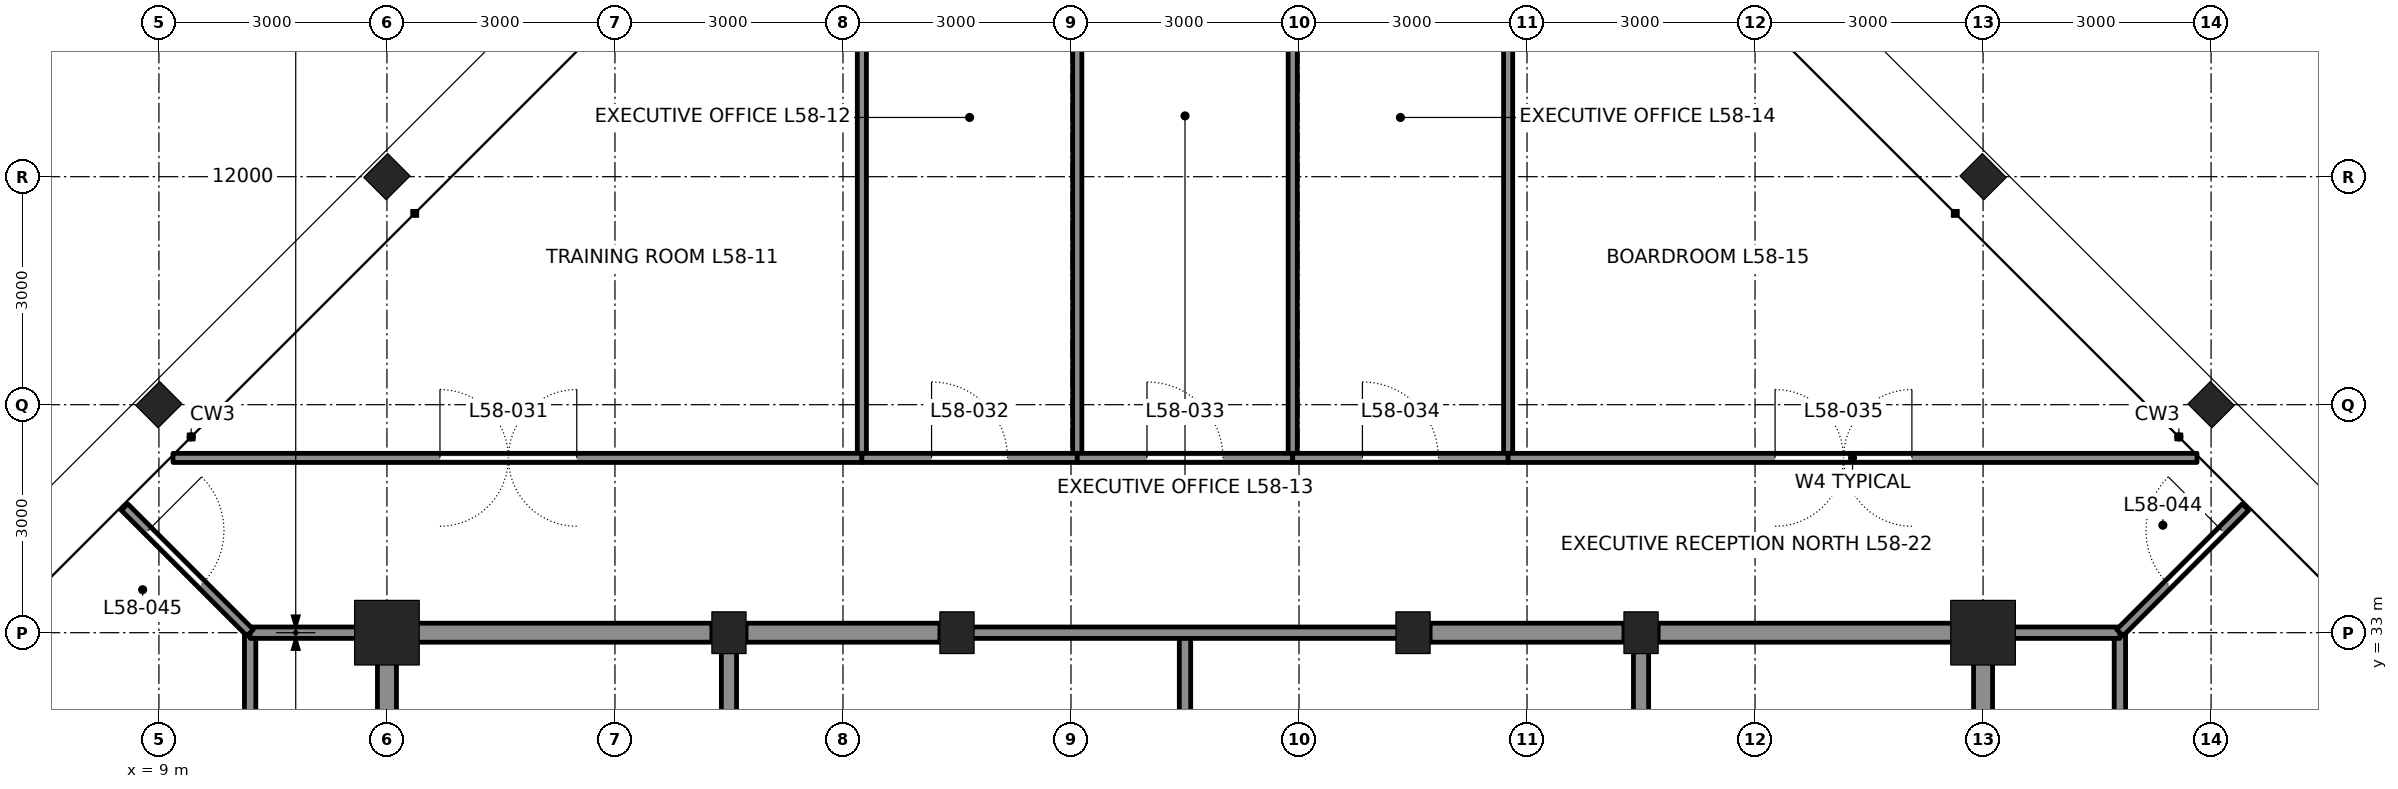
"""IFC4 building model, lengths in metres.
Left out: names, types, materials, properties, quantities, classifications, styles, units other than length and angle.
Written with IfcOpenShell. Run it as: python <this file> out.ifc"""

import sys

from ifc_helpers import new_model, si_unit, direction, frame, frame_2d, origin, origin_2d, place, context, subcontext, project, spatial, rectangle, hollow_rectangle, i_section, extrude, element, fill, save


model = new_model("IFC4")
c1 = context("Model", 3, precision=1e-05, world=origin(), true_north=direction((0.0, 1.0)))
c2 = subcontext(c1, "Body", "Model", "MODEL_VIEW")
j1 = project(units=[si_unit("LENGTHUNIT", "METRE"), si_unit("PLANEANGLEUNIT", "RADIAN")], contexts=[c1])
p1 = place(None, origin())
s1 = spatial("IfcSite", under=j1, at=p1, CompositionType="ELEMENT")
p2 = place(p1, origin())
s2 = spatial("IfcBuilding", under=s1, at=p2, CompositionType="ELEMENT")
p3 = place(p2, frame((0.0, 0.0, 262.2)))
s3 = spatial("IfcBuildingStorey", under=s2, at=p3, CompositionType="ELEMENT", Elevation=262.2)
for number, where, z_axis, x_axis in (
    (1, (36.0, 36.0, 0.0), (0.0, 0.0, 1.0), (0.707, 0.707, 0.0)),
    (2, (33.0, 39.0, 0.0), (0.0, 0.0, 1.0), (0.707, 0.707, 0.0)),
    (3, (12.0, 39.0, 0.0), (0.0, 0.0, 1.0), (-0.707, 0.707, 0.0)),
    (4, (9.0, 36.0, 0.0), (0.0, 0.0, 1.0), (-0.707, 0.707, 0.0)),
):
    element("IfcColumn", number, at=place(p3, frame(where, z_axis=z_axis, x_axis=x_axis)), inside=s3, PredefinedType="COLUMN", context=c2, shape_type="SweptSolid", body=[
        extrude(i_section(OverallWidth=0.417, OverallDepth=0.445, WebThickness=0.039, FlangeThickness=0.063, at=origin_2d()), origin(), (0.0, 0.0, 1.0), 4.2),
    ])
p4 = place(p3, frame((12.0, 33.0, 0.0), z_axis=(0.0, 0.0, 1.0), x_axis=(1.0, 0.0, 0.0)))
e5 = element("IfcColumn", 5, at=p4, inside=s3, PredefinedType="COLUMN", context=c2, shape_type="SweptSolid", body=[
    extrude(hollow_rectangle(XDim=0.85, YDim=0.85, WallThickness=0.085, at=origin_2d()), origin(), (0.0, 0.0, 1.0), 4.2),
])
for number, where, z_axis, x_axis in (
    (6, (16.5, 33.0, 0.0), (0.0, 0.0, 1.0), (1.0, 0.0, 0.0)),
    (7, (19.5, 33.0, 0.0), (0.0, 0.0, 1.0), (1.0, 0.0, 0.0)),
    (8, (25.5, 33.0, 0.0), (0.0, 0.0, 1.0), (1.0, 0.0, 0.0)),
    (9, (28.5, 33.0, 0.0), (0.0, 0.0, 1.0), (1.0, 0.0, 0.0)),
):
    element("IfcColumn", number, at=place(p3, frame(where, z_axis=z_axis, x_axis=x_axis)), inside=s3, PredefinedType="COLUMN", context=c2, shape_type="SweptSolid", body=[
        extrude(i_section(OverallWidth=0.449, OverallDepth=0.549, WebThickness=0.072, FlangeThickness=0.115, at=origin_2d()), origin(), (0.0, 0.0, 1.0), 4.2),
    ])
p5 = place(p3, frame((33.0, 33.0, 0.0), z_axis=(0.0, 0.0, 1.0), x_axis=(1.0, 0.0, 0.0)))
e10 = element("IfcColumn", 10, at=p5, inside=s3, PredefinedType="COLUMN", context=c2, shape_type="SweptSolid", body=[
    extrude(hollow_rectangle(XDim=0.85, YDim=0.85, WallThickness=0.085, at=origin_2d()), origin(), (0.0, 0.0, 1.0), 4.2),
])
p6 = place(p3, frame((12.0, 24.25, 0.0), z_axis=(0.0, 0.0, 1.0), x_axis=(0.0, 1.0, 0.0)))
e11 = element("IfcWall", 11, at=p6, inside=s3, PredefinedType="SOLIDWALL", context=c2, shape_type="SweptSolid", body=[
    extrude(rectangle(XDim=8.5, YDim=0.25, at=frame_2d((4.25, 0.0))), origin(), (0.0, 0.0, 1.0), 3.113),
])
p7 = place(p6, frame((0.65, 0.0, 0.0)))
e12 = element("IfcOpeningElement", 12, at=p7, cuts=e11, PredefinedType="OPENING", context=c2, shape_type="SweptSolid", body=[
    extrude(rectangle(XDim=1.2, YDim=2.1, at=frame_2d((0.6, 1.05))), frame((0.0, 0.135, 0.0), z_axis=(0.0, -1.0, 0.0), x_axis=(1.0, 0.0, 0.0)), (0.0, 0.0, 1.0), 0.27),
])
p8 = place(p6, frame((6.875, 0.0, 0.0)))
e13 = element("IfcOpeningElement", 13, at=p8, cuts=e11, PredefinedType="OPENING", context=c2, shape_type="SweptSolid", body=[
    extrude(rectangle(XDim=0.75, YDim=2.1, at=frame_2d((0.375, 1.05))), frame((0.0, 0.135, 0.0), z_axis=(0.0, -1.0, 0.0), x_axis=(1.0, 0.0, 0.0)), (0.0, 0.0, 1.0), 0.27),
])
p9 = place(p3, frame((12.25, 33.0, 0.0), z_axis=(0.0, 0.0, 1.0), x_axis=(1.0, 0.0, 0.0)))
e14 = element("IfcWall", 14, at=p9, inside=s3, PredefinedType="SOLIDWALL", context=c2, shape_type="SweptSolid", body=[
    extrude(rectangle(XDim=4.025, YDim=0.25, at=frame_2d((2.013, 0.0))), origin(), (0.0, 0.0, 1.0), 3.182),
])
for number, where, z_axis, x_axis in (
    (15, (16.725, 33.0, 0.0), (0.0, 0.0, 1.0), (1.0, 0.0, 0.0)),
    (16, (25.725, 33.0, 0.0), (0.0, 0.0, 1.0), (1.0, 0.0, 0.0)),
):
    element("IfcWall", number, at=place(p3, frame(where, z_axis=z_axis, x_axis=x_axis)), inside=s3, PredefinedType="SOLIDWALL", context=c2, shape_type="SweptSolid", body=[
        extrude(rectangle(XDim=2.55, YDim=0.25, at=frame_2d((1.275, 0.0))), origin(), (0.0, 0.0, 1.0), 3.182),
    ])
p10 = place(p3, frame((28.725, 33.0, 0.0), z_axis=(0.0, 0.0, 1.0), x_axis=(1.0, 0.0, 0.0)))
e17 = element("IfcWall", 17, at=p10, inside=s3, PredefinedType="SOLIDWALL", context=c2, shape_type="SweptSolid", body=[
    extrude(rectangle(XDim=4.025, YDim=0.25, at=frame_2d((2.013, 0.0))), origin(), (0.0, 0.0, 1.0), 3.182),
])
for number, where, z_axis, x_axis in (
    (18, (16.5, 24.25, 0.0), (0.0, 0.0, 1.0), (0.0, 1.0, 0.0)),
    (19, (28.5, 24.25, 0.0), (0.0, 0.0, 1.0), (0.0, 1.0, 0.0)),
):
    element("IfcWall", number, at=place(p3, frame(where, z_axis=z_axis, x_axis=x_axis)), inside=s3, PredefinedType="SOLIDWALL", context=c2, shape_type="SweptSolid", body=[
        extrude(rectangle(XDim=8.5, YDim=0.2, at=frame_2d((4.25, 0.0))), origin(), (0.0, 0.0, 1.0), 3.113),
    ])
p11 = place(p3, frame((33.0, 24.25, 0.0), z_axis=(0.0, 0.0, 1.0), x_axis=(0.0, 1.0, 0.0)))
e20 = element("IfcWall", 20, at=p11, inside=s3, PredefinedType="SOLIDWALL", context=c2, shape_type="SweptSolid", body=[
    extrude(rectangle(XDim=8.5, YDim=0.25, at=frame_2d((4.25, 0.0))), origin(), (0.0, 0.0, 1.0), 3.113),
])
p12 = place(p11, frame((6.875, 0.0, 0.0)))
e21 = element("IfcOpeningElement", 21, at=p12, cuts=e20, PredefinedType="OPENING", context=c2, shape_type="SweptSolid", body=[
    extrude(rectangle(XDim=0.75, YDim=2.1, at=frame_2d((0.375, 1.05))), frame((0.0, 0.135, 0.0), z_axis=(0.0, -1.0, 0.0), x_axis=(1.0, 0.0, 0.0)), (0.0, 0.0, 1.0), 0.27),
])
p13 = place(p3, frame((22.5, 27.0, 0.0), z_axis=(0.0, 0.0, 1.0), x_axis=(0.0, 1.0, 0.0)))
e22 = element("IfcWall", 22, at=p13, inside=s3, PredefinedType="PARTITIONING", context=c2, shape_type="SweptSolid", body=[
    extrude(rectangle(XDim=6.0, YDim=0.15, at=frame_2d((3.0, 0.0))), origin(), (0.0, 0.0, 1.0), 4.04),
])
p14 = place(p3, frame((19.5, 33.0, 0.0), z_axis=(0.0, 0.0, 1.0), x_axis=(1.0, 0.0, 0.0)))
e23 = element("IfcWall", 23, at=p14, inside=s3, PredefinedType="PARTITIONING", context=c2, shape_type="SweptSolid", body=[
    extrude(rectangle(XDim=6.0, YDim=0.15, at=frame_2d((3.0, 0.0))), origin(), (0.0, 0.0, 1.0), 3.182),
])
p15 = place(p3, frame((18.249, 44.334, 0.0), z_axis=(0.0, 0.0, 1.0), x_axis=(0.0, -1.0, 0.0)))
e24 = element("IfcWall", 24, at=p15, inside=s3, PredefinedType="PARTITIONING", context=c2, shape_type="SweptSolid", body=[
    extrude(rectangle(XDim=9.034, YDim=0.12, at=frame_2d((4.517, 0.0))), origin(), (0.0, 0.0, 1.0), 4.04),
])
for number, where, z_axis, x_axis in (
    (25, (21.083, 44.347, 0.0), (0.0, 0.0, 1.0), (0.0, -1.0, 0.0)),
    (26, (23.917, 44.347, 0.0), (0.0, 0.0, 1.0), (0.0, -1.0, 0.0)),
):
    element("IfcWall", number, at=place(p3, frame(where, z_axis=z_axis, x_axis=x_axis)), inside=s3, PredefinedType="PARTITIONING", context=c2, shape_type="SweptSolid", body=[
        extrude(rectangle(XDim=9.047, YDim=0.12, at=frame_2d((4.524, 0.0))), origin(), (0.0, 0.0, 1.0), 3.357),
    ])
p16 = place(p3, frame((26.751, 44.334, 0.0), z_axis=(0.0, 0.0, 1.0), x_axis=(0.0, -1.0, 0.0)))
e27 = element("IfcWall", 27, at=p16, inside=s3, PredefinedType="PARTITIONING", context=c2, shape_type="SweptSolid", body=[
    extrude(rectangle(XDim=9.034, YDim=0.12, at=frame_2d((4.517, 0.0))), origin(), (0.0, 0.0, 1.0), 4.04),
])
p17 = place(p3, frame((9.186, 35.3, 0.0), z_axis=(0.0, 0.0, 1.0), x_axis=(1.0, 0.0, 0.0)))
e28 = element("IfcWall", 28, at=p17, inside=s3, PredefinedType="PARTITIONING", context=c2, shape_type="SweptSolid", body=[
    extrude(rectangle(XDim=9.063, YDim=0.12, at=frame_2d((4.531, 0.0))), origin(), (0.0, 0.0, 1.0), 4.04),
])
p18 = place(p17, frame((3.512, 0.0, 0.0)))
e29 = element("IfcOpeningElement", 29, at=p18, cuts=e28, PredefinedType="OPENING", context=c2, shape_type="SweptSolid", body=[
    extrude(rectangle(XDim=1.8, YDim=2.4, at=frame_2d((0.9, 1.2))), frame((0.0, 0.07, 0.0), z_axis=(0.0, -1.0, 0.0), x_axis=(1.0, 0.0, 0.0)), (0.0, 0.0, 1.0), 0.14),
])
p19 = place(p3, frame((18.249, 35.3, 0.0), z_axis=(0.0, 0.0, 1.0), x_axis=(1.0, 0.0, 0.0)))
e30 = element("IfcWall", 30, at=p19, inside=s3, PredefinedType="PARTITIONING", context=c2, shape_type="SweptSolid", body=[
    extrude(rectangle(XDim=2.834, YDim=0.12, at=frame_2d((1.417, 0.0))), origin(), (0.0, 0.0, 1.0), 4.04),
])
p20 = place(p19, frame((0.917, 0.0, 0.0)))
e31 = element("IfcOpeningElement", 31, at=p20, cuts=e30, PredefinedType="OPENING", context=c2, shape_type="SweptSolid", body=[
    extrude(rectangle(XDim=1.0, YDim=2.4, at=frame_2d((0.5, 1.2))), frame((0.0, 0.07, 0.0), z_axis=(0.0, -1.0, 0.0), x_axis=(1.0, 0.0, 0.0)), (0.0, 0.0, 1.0), 0.14),
])
p21 = place(p3, frame((21.083, 35.3, 0.0), z_axis=(0.0, 0.0, 1.0), x_axis=(1.0, 0.0, 0.0)))
e32 = element("IfcWall", 32, at=p21, inside=s3, PredefinedType="PARTITIONING", context=c2, shape_type="SweptSolid", body=[
    extrude(rectangle(XDim=2.834, YDim=0.12, at=frame_2d((1.417, 0.0))), origin(), (0.0, 0.0, 1.0), 4.04),
])
p22 = place(p21, frame((0.917, 0.0, 0.0)))
e33 = element("IfcOpeningElement", 33, at=p22, cuts=e32, PredefinedType="OPENING", context=c2, shape_type="SweptSolid", body=[
    extrude(rectangle(XDim=1.0, YDim=2.4, at=frame_2d((0.5, 1.2))), frame((0.0, 0.07, 0.0), z_axis=(0.0, -1.0, 0.0), x_axis=(1.0, 0.0, 0.0)), (0.0, 0.0, 1.0), 0.14),
])
p23 = place(p3, frame((23.917, 35.3, 0.0), z_axis=(0.0, 0.0, 1.0), x_axis=(1.0, 0.0, 0.0)))
e34 = element("IfcWall", 34, at=p23, inside=s3, PredefinedType="PARTITIONING", context=c2, shape_type="SweptSolid", body=[
    extrude(rectangle(XDim=2.834, YDim=0.12, at=frame_2d((1.417, 0.0))), origin(), (0.0, 0.0, 1.0), 4.04),
])
p24 = place(p23, frame((0.917, 0.0, 0.0)))
e35 = element("IfcOpeningElement", 35, at=p24, cuts=e34, PredefinedType="OPENING", context=c2, shape_type="SweptSolid", body=[
    extrude(rectangle(XDim=1.0, YDim=2.4, at=frame_2d((0.5, 1.2))), frame((0.0, 0.07, 0.0), z_axis=(0.0, -1.0, 0.0), x_axis=(1.0, 0.0, 0.0)), (0.0, 0.0, 1.0), 0.14),
])
p25 = place(p3, frame((26.751, 35.3, 0.0), z_axis=(0.0, 0.0, 1.0), x_axis=(1.0, 0.0, 0.0)))
e36 = element("IfcWall", 36, at=p25, inside=s3, PredefinedType="PARTITIONING", context=c2, shape_type="SweptSolid", body=[
    extrude(rectangle(XDim=9.063, YDim=0.12, at=frame_2d((4.531, 0.0))), origin(), (0.0, 0.0, 1.0), 4.04),
])
p26 = place(p25, frame((3.512, 0.0, 0.0)))
e37 = element("IfcOpeningElement", 37, at=p26, cuts=e36, PredefinedType="OPENING", context=c2, shape_type="SweptSolid", body=[
    extrude(rectangle(XDim=1.8, YDim=2.4, at=frame_2d((0.9, 1.2))), frame((0.0, 0.07, 0.0), z_axis=(0.0, -1.0, 0.0), x_axis=(1.0, 0.0, 0.0)), (0.0, 0.0, 1.0), 0.14),
])
p27 = place(p3, frame((10.2, 8.686, 0.0), z_axis=(0.0, 0.0, 1.0), x_axis=(0.0, 1.0, 0.0)))
e38 = element("IfcWall", 38, at=p27, inside=s3, PredefinedType="PARTITIONING", context=c2, shape_type="SweptSolid", body=[
    extrude(rectangle(XDim=24.314, YDim=0.15, at=frame_2d((12.157, 0.0))), origin(), (0.0, 0.0, 1.0), 4.04),
])
p28 = place(p27, frame((11.5, 0.0, 0.0)))
e39 = element("IfcOpeningElement", 39, at=p28, cuts=e38, PredefinedType="OPENING", context=c2, shape_type="SweptSolid", body=[
    extrude(rectangle(XDim=1.0, YDim=2.4, at=frame_2d((0.5, 1.2))), frame((0.0, 0.085, 0.0), z_axis=(0.0, -1.0, 0.0), x_axis=(1.0, 0.0, 0.0)), (0.0, 0.0, 1.0), 0.17),
])
p29 = place(p3, frame((10.2, 33.0, 0.0), z_axis=(0.0, 0.0, 1.0), x_axis=(1.0, 0.0, 0.0)))
e40 = element("IfcWall", 40, at=p29, inside=s3, PredefinedType="PARTITIONING", context=c2, shape_type="SweptSolid", body=[
    extrude(rectangle(XDim=1.8, YDim=0.15, at=frame_2d((0.9, 0.0))), origin(), (0.0, 0.0, 1.0), 3.271),
])
p30 = place(p3, frame((34.8, 8.686, 0.0), z_axis=(0.0, 0.0, 1.0), x_axis=(0.0, 1.0, 0.0)))
e41 = element("IfcWall", 41, at=p30, inside=s3, PredefinedType="PARTITIONING", context=c2, shape_type="SweptSolid", body=[
    extrude(rectangle(XDim=24.314, YDim=0.15, at=frame_2d((12.157, 0.0))), origin(), (0.0, 0.0, 1.0), 4.04),
])
p31 = place(p30, frame((11.5, 0.0, 0.0)))
e42 = element("IfcOpeningElement", 42, at=p31, cuts=e41, PredefinedType="OPENING", context=c2, shape_type="SweptSolid", body=[
    extrude(rectangle(XDim=1.0, YDim=2.4, at=frame_2d((0.5, 1.2))), frame((0.0, 0.085, 0.0), z_axis=(0.0, -1.0, 0.0), x_axis=(1.0, 0.0, 0.0)), (0.0, 0.0, 1.0), 0.17),
])
p32 = place(p3, frame((33.0, 33.0, 0.0), z_axis=(0.0, 0.0, 1.0), x_axis=(1.0, 0.0, 0.0)))
e43 = element("IfcWall", 43, at=p32, inside=s3, PredefinedType="PARTITIONING", context=c2, shape_type="SweptSolid", body=[
    extrude(rectangle(XDim=1.8, YDim=0.15, at=frame_2d((0.9, 0.0))), origin(), (0.0, 0.0, 1.0), 3.271),
])
p33 = place(p3, frame((34.8, 33.0, 0.0), z_axis=(0.0, 0.0, 1.0), x_axis=(0.707106781187, 0.707106781187, 0.0)))
e44 = element("IfcWall", 44, at=p33, inside=s3, PredefinedType="PARTITIONING", context=c2, shape_type="SweptSolid", body=[
    extrude(rectangle(XDim=2.338, YDim=0.12, at=frame_2d((1.169, 0.0))), origin(), (0.0, 0.0, 1.0), 4.04),
])
p34 = place(p33, frame((0.9, 0.0, 0.0)))
e45 = element("IfcOpeningElement", 45, at=p34, cuts=e44, PredefinedType="OPENING", context=c2, shape_type="SweptSolid", body=[
    extrude(rectangle(XDim=1.0, YDim=2.4, at=frame_2d((0.5, 1.2))), frame((0.0, 0.07, 0.0), z_axis=(0.0, -1.0, 0.0), x_axis=(1.0, 0.0, 0.0)), (0.0, 0.0, 1.0), 0.14),
])
p35 = place(p3, frame((10.2, 33.0, 0.0), z_axis=(0.0, 0.0, 1.0), x_axis=(-0.707106781187, 0.707106781187, 0.0)))
e46 = element("IfcWall", 46, at=p35, inside=s3, PredefinedType="PARTITIONING", context=c2, shape_type="SweptSolid", body=[
    extrude(rectangle(XDim=2.338, YDim=0.12, at=frame_2d((1.169, 0.0))), origin(), (0.0, 0.0, 1.0), 4.04),
])
p36 = place(p35, frame((0.9, 0.0, 0.0)))
e47 = element("IfcOpeningElement", 47, at=p36, cuts=e46, PredefinedType="OPENING", context=c2, shape_type="SweptSolid", body=[
    extrude(rectangle(XDim=1.0, YDim=2.4, at=frame_2d((0.5, 1.2))), frame((0.0, 0.07, 0.0), z_axis=(0.0, -1.0, 0.0), x_axis=(1.0, 0.0, 0.0)), (0.0, 0.0, 1.0), 0.14),
])
p37 = place(p18, origin())
e48 = element("IfcDoor", 48, at=p37, inside=s3, OperationType="DOUBLE_DOOR_DOUBLE_SWING", PredefinedType="DOOR", context=c2, shape_type="SweptSolid", body=[
    extrude(rectangle(XDim=1.8, YDim=2.4, at=frame_2d((0.9, 1.2))), frame((0.0, 0.025, 0.0), z_axis=(0.0, -1.0, 0.0), x_axis=(1.0, 0.0, 0.0)), (0.0, 0.0, 1.0), 0.05),
])
fill(e29, e48)
p38 = place(p20, origin())
e49 = element("IfcDoor", 49, at=p38, inside=s3, OperationType="SINGLE_SWING_LEFT", PredefinedType="DOOR", context=c2, shape_type="SweptSolid", body=[
    extrude(rectangle(XDim=1.0, YDim=2.4, at=frame_2d((0.5, 1.2))), frame((0.0, 0.025, 0.0), z_axis=(0.0, -1.0, 0.0), x_axis=(1.0, 0.0, 0.0)), (0.0, 0.0, 1.0), 0.05),
])
fill(e31, e49)
p39 = place(p22, origin())
e50 = element("IfcDoor", 50, at=p39, inside=s3, OperationType="SINGLE_SWING_LEFT", PredefinedType="DOOR", context=c2, shape_type="SweptSolid", body=[
    extrude(rectangle(XDim=1.0, YDim=2.4, at=frame_2d((0.5, 1.2))), frame((0.0, 0.025, 0.0), z_axis=(0.0, -1.0, 0.0), x_axis=(1.0, 0.0, 0.0)), (0.0, 0.0, 1.0), 0.05),
])
fill(e33, e50)
p40 = place(p24, origin())
e51 = element("IfcDoor", 51, at=p40, inside=s3, OperationType="SINGLE_SWING_LEFT", PredefinedType="DOOR", context=c2, shape_type="SweptSolid", body=[
    extrude(rectangle(XDim=1.0, YDim=2.4, at=frame_2d((0.5, 1.2))), frame((0.0, 0.025, 0.0), z_axis=(0.0, -1.0, 0.0), x_axis=(1.0, 0.0, 0.0)), (0.0, 0.0, 1.0), 0.05),
])
fill(e35, e51)
p41 = place(p26, origin())
e52 = element("IfcDoor", 52, at=p41, inside=s3, OperationType="DOUBLE_DOOR_DOUBLE_SWING", PredefinedType="DOOR", context=c2, shape_type="SweptSolid", body=[
    extrude(rectangle(XDim=1.8, YDim=2.4, at=frame_2d((0.9, 1.2))), frame((0.0, 0.025, 0.0), z_axis=(0.0, -1.0, 0.0), x_axis=(1.0, 0.0, 0.0)), (0.0, 0.0, 1.0), 0.05),
])
fill(e37, e52)
p42 = place(p34, origin())
e53 = element("IfcDoor", 53, at=p42, inside=s3, OperationType="SINGLE_SWING_RIGHT", PredefinedType="DOOR", context=c2, shape_type="SweptSolid", body=[
    extrude(rectangle(XDim=1.0, YDim=2.4, at=frame_2d((0.5, 1.2))), frame((0.0, 0.025, 0.0), z_axis=(0.0, -1.0, 0.0), x_axis=(1.0, 0.0, 0.0)), (0.0, 0.0, 1.0), 0.05),
])
fill(e45, e53)
p43 = place(p36, frame((1.0, 0.0, 0.0), z_axis=(0.0, 0.0, 1.0), x_axis=(-1.0, 0.0, 0.0)))
e54 = element("IfcDoor", 54, at=p43, inside=s3, OperationType="SINGLE_SWING_LEFT", PredefinedType="DOOR", context=c2, shape_type="SweptSolid", body=[
    extrude(rectangle(XDim=1.0, YDim=2.4, at=frame_2d((0.5, 1.2))), frame((0.0, 0.025, 0.0), z_axis=(0.0, -1.0, 0.0), x_axis=(1.0, 0.0, 0.0)), (0.0, 0.0, 1.0), 0.05),
])
fill(e47, e54)
save(model, sys.argv[1])
